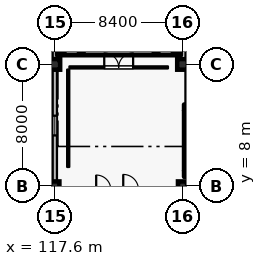
"""IFC4 building model, lengths in metres.
Left out: names, types, materials, properties, quantities, classifications, styles, units other than length and angle.
Written with IfcOpenShell. Run it as: python <this file> out.ifc"""

import sys

from ifc_helpers import new_model, si_unit, direction, frame, frame_2d, origin, origin_2d, place, context, subcontext, project, spatial, rectangle, hollow_rectangle, extrude, element, fill, save


model = new_model("IFC4")
c1 = context("Model", 3, precision=1e-05, world=origin(), true_north=direction((0.0, 1.0)))
c2 = subcontext(c1, "Body", "Model", "MODEL_VIEW")
j1 = project(units=[si_unit("LENGTHUNIT", "METRE"), si_unit("PLANEANGLEUNIT", "RADIAN")], contexts=[c1])
p1 = place(None, origin())
s1 = spatial("IfcSite", under=j1, at=p1, CompositionType="ELEMENT")
p2 = place(p1, origin())
s2 = spatial("IfcBuilding", under=s1, at=p2, CompositionType="ELEMENT")
p3 = place(p2, frame((0.0, 0.0, 32.4)))
s3 = spatial("IfcBuildingStorey", under=s2, at=p3, CompositionType="ELEMENT", Elevation=32.4)
for number, where, z_axis, x_axis in (
    (1, (117.6, 16.0, 0.0), (0.0, 0.0, 1.0), (1.0, 0.0, 0.0)),
    (2, (126.0, 16.0, 0.0), (0.0, 0.0, 1.0), (1.0, 0.0, 0.0)),
):
    element("IfcColumn", number, at=place(p3, frame(where, z_axis=z_axis, x_axis=x_axis)), inside=s3, PredefinedType="COLUMN", context=c2, shape_type="SweptSolid", body=[
        extrude(rectangle(XDim=0.7, YDim=0.7, at=origin_2d()), origin(), (0.0, 0.0, 1.0), 3.6),
    ])
for number, where, z_axis, x_axis in (
    (3, (117.6, 8.0, 0.0), (0.0, 0.0, 1.0), (1.0, 0.0, 0.0)),
    (4, (126.0, 8.0, 0.0), (0.0, 0.0, 1.0), (1.0, 0.0, 0.0)),
):
    element("IfcColumn", number, at=place(p3, frame(where, z_axis=z_axis, x_axis=x_axis)), inside=s3, PredefinedType="COLUMN", context=c2, shape_type="SweptSolid", body=[
        extrude(rectangle(XDim=0.6, YDim=0.6, at=origin_2d()), origin(), (0.0, 0.0, 1.0), 3.6),
    ])
p4 = place(p3, frame((117.6, 8.3, 0.0), z_axis=(0.0, 0.0, 1.0), x_axis=(0.0, 1.0, 0.0)))
e5 = element("IfcWall", 5, at=p4, inside=s3, PredefinedType="SOLIDWALL", context=c2, shape_type="SweptSolid", body=[
    extrude(rectangle(XDim=7.35, YDim=0.28, at=frame_2d((3.675, 0.0))), origin(), (0.0, 0.0, 1.0), 2.7),
])
p5 = place(p4, frame((3.025, 0.0, 0.5)))
e6 = element("IfcOpeningElement", 6, at=p5, cuts=e5, PredefinedType="OPENING", context=c2, shape_type="SweptSolid", body=[
    extrude(rectangle(XDim=1.3, YDim=1.65, at=frame_2d((0.65, 0.825))), frame((0.0, 0.15, 0.0), z_axis=(0.0, -1.0, 0.0), x_axis=(1.0, 0.0, 0.0)), (0.0, 0.0, 1.0), 0.3),
])
p6 = place(p3, frame((117.6, 16.35, 0.0), z_axis=(0.0, 0.0, 1.0), x_axis=(0.0, 1.0, 0.0)))
e7 = element("IfcWall", 7, at=p6, inside=s3, PredefinedType="SOLIDWALL", context=c2, shape_type="SweptSolid", body=[
    extrude(rectangle(XDim=7.35, YDim=0.28, at=frame_2d((3.675, 0.0))), origin(), (0.0, 0.0, 1.0), 2.7),
])
p7 = place(p6, frame((3.025, 0.0, 0.5)))
e8 = element("IfcOpeningElement", 8, at=p7, cuts=e7, PredefinedType="OPENING", context=c2, shape_type="SweptSolid", body=[
    extrude(rectangle(XDim=1.3, YDim=1.65, at=frame_2d((0.65, 0.825))), frame((0.0, 0.15, 0.0), z_axis=(0.0, -1.0, 0.0), x_axis=(1.0, 0.0, 0.0)), (0.0, 0.0, 1.0), 0.3),
])
p8 = place(p3, frame((126.1, 8.8, 0.0), z_axis=(0.0, 0.0, 1.0), x_axis=(1.0, 0.0, 0.0)))
e9 = element("IfcWall", 9, at=p8, inside=s3, PredefinedType="SHEAR", context=c2, shape_type="SweptSolid", body=[
    extrude(rectangle(XDim=8.2, YDim=0.4, at=frame_2d((4.1, 0.0))), origin(), (0.0, 0.0, 1.0), 3.335),
])
p9 = place(p3, frame((126.1, 13.16, 0.0), z_axis=(0.0, 0.0, 1.0), x_axis=(1.0, 0.0, 0.0)))
e10 = element("IfcWall", 10, at=p9, inside=s3, PredefinedType="SHEAR", context=c2, shape_type="SweptSolid", body=[
    extrude(rectangle(XDim=8.2, YDim=0.4, at=frame_2d((4.1, 0.0))), origin(), (0.0, 0.0, 1.0), 3.335),
])
p10 = place(p9, frame((0.43, 0.0, 0.0)))
e11 = element("IfcOpeningElement", 11, at=p10, cuts=e10, PredefinedType="OPENING", context=c2, shape_type="SweptSolid", body=[
    extrude(rectangle(XDim=1.16, YDim=2.2, at=frame_2d((0.58, 1.1))), frame((0.0, 0.21, 0.0), z_axis=(0.0, -1.0, 0.0), x_axis=(1.0, 0.0, 0.0)), (0.0, 0.0, 1.0), 0.42),
])
p11 = place(p3, frame((126.3, 9.005, 0.0), z_axis=(0.0, 0.0, 1.0), x_axis=(0.0, 1.0, 0.0)))
e12 = element("IfcWall", 12, at=p11, inside=s3, PredefinedType="SHEAR", context=c2, shape_type="SweptSolid", body=[
    extrude(rectangle(XDim=3.95, YDim=0.4, at=frame_2d((1.975, 0.0))), origin(), (0.0, 0.0, 1.0), 3.335),
])
p12 = place(p3, frame((126.3, 13.365, 0.0), z_axis=(0.0, 0.0, 1.0), x_axis=(0.0, 1.0, 0.0)))
e13 = element("IfcWall", 13, at=p12, inside=s3, PredefinedType="PARTITIONING", context=c2, shape_type="SweptSolid", body=[
    extrude(rectangle(XDim=5.82, YDim=0.22, at=frame_2d((2.91, 0.0))), origin(), (0.0, 0.0, 1.0), 3.335),
])
p13 = place(p3, frame((117.75, 16.8, 0.0), z_axis=(0.0, 0.0, 1.0), x_axis=(1.0, 0.0, 0.0)))
e14 = element("IfcWall", 14, at=p13, inside=s3, PredefinedType="SHEAR", context=c2, shape_type="SweptSolid", body=[
    extrude(rectangle(XDim=8.15, YDim=0.4, at=frame_2d((4.075, 0.0))), origin(), (0.0, 0.0, 1.0), 3.335),
])
for number, where, z_axis, x_axis in (
    (15, (118.08, 16.8, 0.0), (0.0, 0.0, 1.0), (1.0, 0.0, 0.0)),
    (16, (119.34, 16.8, 0.0), (0.0, 0.0, 1.0), (1.0, 0.0, 0.0)),
):
    element("IfcColumn", number, at=place(p3, frame(where, z_axis=z_axis, x_axis=x_axis)), inside=s3, PredefinedType="COLUMN", context=c2, shape_type="SweptSolid", body=[
        extrude(hollow_rectangle(XDim=0.3, YDim=0.3, WallThickness=0.012, at=origin_2d()), origin(), (0.0, 0.0, 1.0), 3.42),
    ])
for number, where, z_axis, x_axis in (
    (17, (124.26, 16.8, -1.8), (0.0, 0.0, 1.0), (1.0, 0.0, 0.0)),
    (18, (125.52, 16.8, -1.8), (0.0, 0.0, 1.0), (1.0, 0.0, 0.0)),
):
    element("IfcColumn", number, at=place(p3, frame(where, z_axis=z_axis, x_axis=x_axis)), inside=s3, PredefinedType="COLUMN", context=c2, shape_type="SweptSolid", body=[
        extrude(hollow_rectangle(XDim=0.3, YDim=0.3, WallThickness=0.012, at=origin_2d()), origin(), (0.0, 0.0, 1.0), 3.42),
    ])
p14 = place(p3, frame((118.56, 15.8, 0.0), z_axis=(0.0, 0.0, 1.0), x_axis=(1.0, 0.0, 0.0)))
e19 = element("IfcWall", 19, at=p14, inside=s3, PredefinedType="PARTITIONING", context=c2, shape_type="SweptSolid", body=[
    extrude(rectangle(XDim=6.48, YDim=0.14, at=frame_2d((3.24, 0.0))), origin(), (0.0, 0.0, 1.0), 3.335),
])
p15 = place(p14, frame((2.29, 0.0, 0.0)))
e20 = element("IfcOpeningElement", 20, at=p15, cuts=e19, PredefinedType="OPENING", context=c2, shape_type="SweptSolid", body=[
    extrude(rectangle(XDim=1.9, YDim=2.4, at=frame_2d((0.95, 1.2))), frame((0.0, 0.08, 0.0), z_axis=(0.0, -1.0, 0.0), x_axis=(1.0, 0.0, 0.0)), (0.0, 0.0, 1.0), 0.16),
])
p16 = place(p3, frame((118.48, 9.25, 0.0), z_axis=(0.0, 0.0, 1.0), x_axis=(0.0, 1.0, 0.0)))
e21 = element("IfcWall", 21, at=p16, inside=s3, PredefinedType="PARTITIONING", context=c2, shape_type="SweptSolid", body=[
    extrude(rectangle(XDim=6.41, YDim=0.14, at=frame_2d((3.205, 0.0))), origin(), (0.0, 0.0, 1.0), 3.335),
])
p17 = place(p5, origin())
e22 = element("IfcWindow", 22, at=p17, inside=s3, PartitioningType="SINGLE_PANEL", PredefinedType="WINDOW", context=c2, shape_type="SweptSolid", body=[
    extrude(rectangle(XDim=1.3, YDim=1.65, at=frame_2d((0.65, 0.825))), frame((0.0, 0.03, 0.0), z_axis=(0.0, -1.0, 0.0), x_axis=(1.0, 0.0, 0.0)), (0.0, 0.0, 1.0), 0.06),
])
fill(e6, e22)
p18 = place(p15, origin())
e23 = element("IfcDoor", 23, at=p18, inside=s3, OperationType="DOUBLE_DOOR_SINGLE_SWING", PredefinedType="DOOR", context=c2, shape_type="SweptSolid", body=[
    extrude(rectangle(XDim=1.9, YDim=2.4, at=frame_2d((0.95, 1.2))), frame((0.0, 0.025, 0.0), z_axis=(0.0, -1.0, 0.0), x_axis=(1.0, 0.0, 0.0)), (0.0, 0.0, 1.0), 0.05),
])
fill(e20, e23)
save(model, sys.argv[1])
